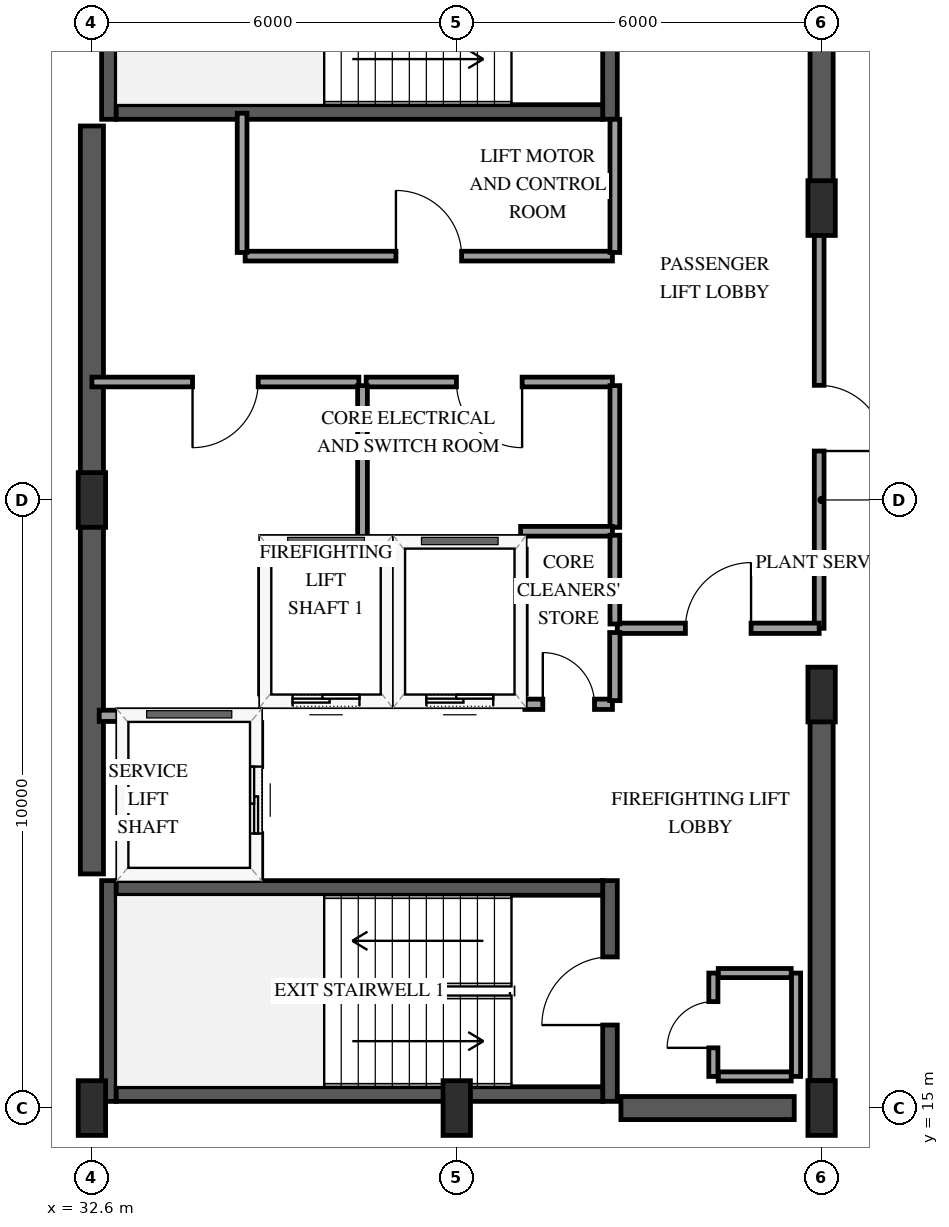
"""IFC4 building model, lengths in metres.
Left out: names, types, materials, properties, quantities, classifications, styles, units other than length and angle.
Written with IfcOpenShell. Run it as: python <this file> out.ifc"""

import sys

from ifc_helpers import new_model, si_unit, direction, frame, frame_2d, origin, origin_2d, place, context, subcontext, project, spatial, rectangle, extrude, element, fill, save


model = new_model("IFC4")
c1 = context("Model", 3, precision=1e-05, world=origin(), true_north=direction((0.0, 1.0)))
c2 = subcontext(c1, "Body", "Model", "MODEL_VIEW")
j1 = project(units=[si_unit("LENGTHUNIT", "METRE"), si_unit("PLANEANGLEUNIT", "RADIAN")], contexts=[c1])
p1 = place(None, origin())
s1 = spatial("IfcSite", under=j1, at=p1, CompositionType="ELEMENT")
p2 = place(p1, origin())
s2 = spatial("IfcBuilding", under=s1, at=p2, CompositionType="ELEMENT")
p3 = place(p2, frame((0.0, 0.0, 309.85)))
s3 = spatial("IfcBuildingStorey", under=s2, at=p3, CompositionType="ELEMENT", Elevation=309.85)
p4 = place(p3, frame((32.88, 15.11, 0.0), z_axis=(0.0, 0.0, 1.0), x_axis=(0.0, 1.0, 0.0)))
e1 = element("IfcWall", 1, at=p4, inside=s3, PredefinedType="SHEAR", context=c2, shape_type="SweptSolid", body=[
    extrude(rectangle(XDim=3.63, YDim=0.24, at=frame_2d((1.815, 0.0))), origin(), (0.0, 0.0, 1.0), 4.2),
])
p5 = place(p3, frame((41.12, 15.11, 0.0), z_axis=(0.0, 0.0, 1.0), x_axis=(0.0, 1.0, 0.0)))
e2 = element("IfcWall", 2, at=p5, inside=s3, PredefinedType="SHEAR", context=c2, shape_type="SweptSolid", body=[
    extrude(rectangle(XDim=3.63, YDim=0.24, at=frame_2d((1.815, 0.0))), origin(), (0.0, 0.0, 1.0), 4.2),
])
p6 = place(p5, frame((1.255, 0.0, 0.0)))
e3 = element("IfcOpeningElement", 3, at=p6, cuts=e2, PredefinedType="OPENING", context=c2, shape_type="SweptSolid", body=[
    extrude(rectangle(XDim=1.12, YDim=2.15, at=frame_2d((0.56, 1.075))), frame((0.0, 0.13, 0.0), z_axis=(0.0, -1.0, 0.0), x_axis=(1.0, 0.0, 0.0)), (0.0, 0.0, 1.0), 0.26),
])
for number, where, z_axis, x_axis in (
    (4, (33.0, 15.23, 0.0), (0.0, 0.0, 1.0), (1.0, 0.0, 0.0)),
    (5, (33.0, 18.62, 0.0), (0.0, 0.0, 1.0), (1.0, 0.0, 0.0)),
):
    element("IfcWall", number, at=place(p3, frame(where, z_axis=z_axis, x_axis=x_axis)), inside=s3, PredefinedType="SHEAR", context=c2, shape_type="SweptSolid", body=[
        extrude(rectangle(XDim=8.0, YDim=0.24, at=frame_2d((4.0, 0.0))), origin(), (0.0, 0.0, 1.0), 4.2),
    ])
p7 = place(p3, frame((32.88, 31.26, 0.0), z_axis=(0.0, 0.0, 1.0), x_axis=(0.0, 1.0, 0.0)))
e6 = element("IfcWall", 6, at=p7, inside=s3, PredefinedType="SHEAR", context=c2, shape_type="SweptSolid", body=[
    extrude(rectangle(XDim=3.63, YDim=0.24, at=frame_2d((1.815, 0.0))), origin(), (0.0, 0.0, 1.0), 4.2),
])
p8 = place(p3, frame((41.12, 31.26, 0.0), z_axis=(0.0, 0.0, 1.0), x_axis=(0.0, 1.0, 0.0)))
e7 = element("IfcWall", 7, at=p8, inside=s3, PredefinedType="SHEAR", context=c2, shape_type="SweptSolid", body=[
    extrude(rectangle(XDim=3.63, YDim=0.24, at=frame_2d((1.815, 0.0))), origin(), (0.0, 0.0, 1.0), 4.2),
])
p9 = place(p8, frame((1.255, 0.0, 0.0)))
e8 = element("IfcOpeningElement", 8, at=p9, cuts=e7, PredefinedType="OPENING", context=c2, shape_type="SweptSolid", body=[
    extrude(rectangle(XDim=1.12, YDim=2.15, at=frame_2d((0.56, 1.075))), frame((0.0, 0.13, 0.0), z_axis=(0.0, -1.0, 0.0), x_axis=(1.0, 0.0, 0.0)), (0.0, 0.0, 1.0), 0.26),
])
p10 = place(p3, frame((33.0, 31.38, 0.0), z_axis=(0.0, 0.0, 1.0), x_axis=(1.0, 0.0, 0.0)))
e9 = element("IfcWall", 9, at=p10, inside=s3, PredefinedType="SHEAR", context=c2, shape_type="SweptSolid", body=[
    extrude(rectangle(XDim=8.0, YDim=0.24, at=frame_2d((4.0, 0.0))), origin(), (0.0, 0.0, 1.0), 4.2),
])
p11 = place(p3, frame((32.6, 18.85, 0.0), z_axis=(0.0, 0.0, 1.0), x_axis=(0.0, 1.0, 0.0)))
e10 = element("IfcWall", 10, at=p11, inside=s3, PredefinedType="SHEAR", context=c2, shape_type="SweptSolid", body=[
    extrude(rectangle(XDim=12.3, YDim=0.38, at=frame_2d((6.15, 0.0))), origin(), (0.0, 0.0, 1.0), 4.2),
])
p12 = place(p3, frame((41.3, 15.0, 0.0), z_axis=(0.0, 0.0, 1.0), x_axis=(1.0, 0.0, 0.0)))
e11 = element("IfcWall", 11, at=p12, inside=s3, PredefinedType="SHEAR", context=c2, shape_type="SweptSolid", body=[
    extrude(rectangle(XDim=2.85, YDim=0.38, at=frame_2d((1.425, 0.0))), origin(), (0.0, 0.0, 1.0), 4.2),
])
p13 = place(p3, frame((44.6, 15.45, 0.0), z_axis=(0.0, 0.0, 1.0), x_axis=(0.0, 1.0, 0.0)))
e12 = element("IfcWall", 12, at=p13, inside=s3, PredefinedType="SHEAR", context=c2, shape_type="SweptSolid", body=[
    extrude(rectangle(XDim=6.35, YDim=0.38, at=frame_2d((3.175, 0.0))), origin(), (0.0, 0.0, 1.0), 4.2),
])
p14 = place(p3, frame((44.6, 29.8, 0.0), z_axis=(0.0, 0.0, 1.0), x_axis=(0.0, 1.0, 0.0)))
e13 = element("IfcWall", 13, at=p14, inside=s3, PredefinedType="SHEAR", context=c2, shape_type="SweptSolid", body=[
    extrude(rectangle(XDim=4.75, YDim=0.38, at=frame_2d((2.375, 0.0))), origin(), (0.0, 0.0, 1.0), 4.2),
])
for number, where, z_axis, x_axis in (
    (14, (32.6, 15.0, 0.0), (0.0, 0.0, 1.0), (1.0, 0.0, 0.0)),
    (15, (32.6, 25.0, 0.0), (0.0, 0.0, 1.0), (1.0, 0.0, 0.0)),
    (16, (38.6, 15.0, 0.0), (0.0, 0.0, 1.0), (1.0, 0.0, 0.0)),
    (17, (44.6, 15.0, 0.0), (0.0, 0.0, 1.0), (1.0, 0.0, 0.0)),
    (18, (44.6, 21.8, 0.0), (0.0, 0.0, 1.0), (1.0, 0.0, 0.0)),
    (19, (44.6, 29.8, 0.0), (0.0, 0.0, 1.0), (1.0, 0.0, 0.0)),
):
    element("IfcColumn", number, at=place(p3, frame(where, z_axis=z_axis, x_axis=x_axis)), inside=s3, PredefinedType="PILASTER", context=c2, shape_type="SweptSolid", body=[
        extrude(rectangle(XDim=0.45, YDim=0.9, at=origin_2d()), origin(), (0.0, 0.0, 1.0), 4.2),
    ])
p15 = place(p3, frame((30.606, 14.373, 0.0), z_axis=(0.0, 0.0, 1.0), x_axis=(0.833507833443, -0.552507639394, 0.0)))
e20 = element("IfcWall", 20, at=p15, inside=s3, PredefinedType="SOLIDWALL", context=c2, shape_type="SweptSolid", body=[
    extrude(rectangle(XDim=6.584, YDim=0.27, at=frame_2d((3.292, 0.0))), origin(), (0.0, 0.0, 1.0), 3.195),
])
p16 = place(p3, frame((35.45, 21.7, 0.0), z_axis=(0.0, 0.0, 1.0), x_axis=(1.0, 0.0, 0.0)))
e21 = element("IfcWall", 21, at=p16, inside=s3, PredefinedType="SOLIDWALL", context=c2, shape_type="SweptSolid", body=[
    extrude(rectangle(XDim=2.0, YDim=0.185, at=frame_2d((1.0, 0.0))), origin(), (0.0, 0.0, 1.0), 3.895),
])
p17 = place(p16, frame((0.45, 0.0, 0.0)))
e22 = element("IfcOpeningElement", 22, at=p17, cuts=e21, PredefinedType="OPENING", context=c2, shape_type="SweptSolid", body=[
    extrude(rectangle(XDim=1.1, YDim=2.15, at=frame_2d((0.55, 1.075))), frame((0.0, 0.103, 0.0), z_axis=(0.0, -1.0, 0.0), x_axis=(1.0, 0.0, 0.0)), (0.0, 0.0, 1.0), 0.205),
])
p18 = place(p3, frame((35.45, 24.3, 0.0), z_axis=(0.0, 0.0, 1.0), x_axis=(1.0, 0.0, 0.0)))
e23 = element("IfcWall", 23, at=p18, inside=s3, PredefinedType="SOLIDWALL", context=c2, shape_type="SweptSolid", body=[
    extrude(rectangle(XDim=2.0, YDim=0.185, at=frame_2d((1.0, 0.0))), origin(), (0.0, 0.0, 1.0), 3.895),
])
for number, where, z_axis, x_axis in (
    (24, (35.45, 21.81, 0.0), (0.0, 0.0, 1.0), (0.0, 1.0, 0.0)),
    (25, (37.45, 21.81, 0.0), (0.0, 0.0, 1.0), (0.0, 1.0, 0.0)),
):
    element("IfcWall", number, at=place(p3, frame(where, z_axis=z_axis, x_axis=x_axis)), inside=s3, PredefinedType="SOLIDWALL", context=c2, shape_type="SweptSolid", body=[
        extrude(rectangle(XDim=2.38, YDim=0.185, at=frame_2d((1.19, 0.0))), origin(), (0.0, 0.0, 1.0), 3.895),
    ])
p19 = place(p3, frame((37.65, 21.7, 0.0), z_axis=(0.0, 0.0, 1.0), x_axis=(1.0, 0.0, 0.0)))
e26 = element("IfcWall", 26, at=p19, inside=s3, PredefinedType="SOLIDWALL", context=c2, shape_type="SweptSolid", body=[
    extrude(rectangle(XDim=2.0, YDim=0.185, at=frame_2d((1.0, 0.0))), origin(), (0.0, 0.0, 1.0), 3.895),
])
p20 = place(p19, frame((0.45, 0.0, 0.0)))
e27 = element("IfcOpeningElement", 27, at=p20, cuts=e26, PredefinedType="OPENING", context=c2, shape_type="SweptSolid", body=[
    extrude(rectangle(XDim=1.1, YDim=2.15, at=frame_2d((0.55, 1.075))), frame((0.0, 0.103, 0.0), z_axis=(0.0, -1.0, 0.0), x_axis=(1.0, 0.0, 0.0)), (0.0, 0.0, 1.0), 0.205),
])
p21 = place(p3, frame((37.65, 24.3, 0.0), z_axis=(0.0, 0.0, 1.0), x_axis=(1.0, 0.0, 0.0)))
e28 = element("IfcWall", 28, at=p21, inside=s3, PredefinedType="SOLIDWALL", context=c2, shape_type="SweptSolid", body=[
    extrude(rectangle(XDim=2.0, YDim=0.185, at=frame_2d((1.0, 0.0))), origin(), (0.0, 0.0, 1.0), 3.895),
])
p22 = place(p3, frame((39.65, 21.81, 0.0), z_axis=(0.0, 0.0, 1.0), x_axis=(0.0, 1.0, 0.0)))
e29 = element("IfcWall", 29, at=p22, inside=s3, PredefinedType="SOLIDWALL", context=c2, shape_type="SweptSolid", body=[
    extrude(rectangle(XDim=2.38, YDim=0.185, at=frame_2d((1.19, 0.0))), origin(), (0.0, 0.0, 1.0), 3.895),
])
p23 = place(p3, frame((32.72, 21.45, 0.0), z_axis=(0.0, 0.0, 1.0), x_axis=(1.0, 0.0, 0.0)))
e30 = element("IfcWall", 30, at=p23, inside=s3, PredefinedType="SOLIDWALL", context=c2, shape_type="SweptSolid", body=[
    extrude(rectangle(XDim=2.58, YDim=0.185, at=frame_2d((1.29, 0.0))), origin(), (0.0, 0.0, 1.0), 3.895),
])
p24 = place(p3, frame((35.3, 18.79, 0.0), z_axis=(0.0, 0.0, 1.0), x_axis=(0.0, 1.0, 0.0)))
e31 = element("IfcWall", 31, at=p24, inside=s3, PredefinedType="SOLIDWALL", context=c2, shape_type="SweptSolid", body=[
    extrude(rectangle(XDim=2.55, YDim=0.185, at=frame_2d((1.275, 0.0))), origin(), (0.0, 0.0, 1.0), 3.895),
])
p25 = place(p24, frame((0.725, 0.0, 0.0)))
e32 = element("IfcOpeningElement", 32, at=p25, cuts=e31, PredefinedType="OPENING", context=c2, shape_type="SweptSolid", body=[
    extrude(rectangle(XDim=1.1, YDim=2.15, at=frame_2d((0.55, 1.075))), frame((0.0, 0.103, 0.0), z_axis=(0.0, -1.0, 0.0), x_axis=(1.0, 0.0, 0.0)), (0.0, 0.0, 1.0), 0.205),
])
for number, where, z_axis, x_axis in (
    (33, (42.9, 15.52, 0.0), (0.0, 0.0, 1.0), (1.0, 0.0, 0.0)),
    (34, (42.9, 17.22, 0.0), (0.0, 0.0, 1.0), (1.0, 0.0, 0.0)),
):
    element("IfcWall", number, at=place(p3, frame(where, z_axis=z_axis, x_axis=x_axis)), inside=s3, PredefinedType="PARTITIONING", context=c2, shape_type="SweptSolid", body=[
        extrude(rectangle(XDim=1.2, YDim=0.15, at=frame_2d((0.6, 0.0))), origin(), (0.0, 0.0, 1.0), 3.895),
    ])
p26 = place(p3, frame((44.18, 15.52, 0.0), z_axis=(0.0, 0.0, 1.0), x_axis=(0.0, 1.0, 0.0)))
e35 = element("IfcWall", 35, at=p26, inside=s3, PredefinedType="PARTITIONING", context=c2, shape_type="SweptSolid", body=[
    extrude(rectangle(XDim=1.7, YDim=0.15, at=frame_2d((0.85, 0.0))), origin(), (0.0, 0.0, 1.0), 3.895),
])
p27 = place(p3, frame((42.82, 15.52, 0.0), z_axis=(0.0, 0.0, 1.0), x_axis=(0.0, 1.0, 0.0)))
e36 = element("IfcWall", 36, at=p27, inside=s3, PredefinedType="PARTITIONING", context=c2, shape_type="SweptSolid", body=[
    extrude(rectangle(XDim=1.7, YDim=0.15, at=frame_2d((0.85, 0.0))), origin(), (0.0, 0.0, 1.0), 3.895),
])
p28 = place(p27, frame((0.47, 0.0, 0.0)))
e37 = element("IfcOpeningElement", 37, at=p28, cuts=e36, PredefinedType="OPENING", context=c2, shape_type="SweptSolid", body=[
    extrude(rectangle(XDim=0.76, YDim=2.0, at=frame_2d((0.38, 1.0))), frame((0.0, 0.085, 0.0), z_axis=(0.0, -1.0, 0.0), x_axis=(1.0, 0.0, 0.0)), (0.0, 0.0, 1.0), 0.17),
])
p29 = place(p3, frame((44.56, 29.8, 0.0), z_axis=(0.0, 0.0, 1.0), x_axis=(0.0, -1.0, 0.0)))
e38 = element("IfcWall", 38, at=p29, inside=s3, PredefinedType="PARTITIONING", context=c2, shape_type="SweptSolid", body=[
    extrude(rectangle(XDim=6.91, YDim=0.16, at=frame_2d((3.455, 0.0))), origin(), (0.0, 0.0, 1.0), 2.935),
])
p30 = place(p29, frame((2.915, 0.0, 0.0)))
e39 = element("IfcOpeningElement", 39, at=p30, cuts=e38, PredefinedType="OPENING", context=c2, shape_type="SweptSolid", body=[
    extrude(rectangle(XDim=1.08, YDim=2.15, at=frame_2d((0.54, 1.075))), frame((0.0, 0.09, 0.0), z_axis=(0.0, -1.0, 0.0), x_axis=(1.0, 0.0, 0.0)), (0.0, 0.0, 1.0), 0.18),
])
p31 = place(p3, frame((35.12, 29.01, 0.0), z_axis=(0.0, 0.0, 1.0), x_axis=(1.0, 0.0, 0.0)))
e40 = element("IfcWall", 40, at=p31, inside=s3, PredefinedType="PARTITIONING", context=c2, shape_type="SweptSolid", body=[
    extrude(rectangle(XDim=6.04, YDim=0.16, at=frame_2d((3.02, 0.0))), origin(), (0.0, 0.0, 1.0), 3.895),
])
p32 = place(p31, frame((2.48, 0.0, 0.0)))
e41 = element("IfcOpeningElement", 41, at=p32, cuts=e40, PredefinedType="OPENING", context=c2, shape_type="SweptSolid", body=[
    extrude(rectangle(XDim=1.08, YDim=2.15, at=frame_2d((0.54, 1.075))), frame((0.0, 0.09, 0.0), z_axis=(0.0, -1.0, 0.0), x_axis=(1.0, 0.0, 0.0)), (0.0, 0.0, 1.0), 0.18),
])
p33 = place(p3, frame((36.99, 26.94, 0.0), z_axis=(0.0, 0.0, 1.0), x_axis=(-1.0, 0.0, 0.0)))
e42 = element("IfcWall", 42, at=p33, inside=s3, PredefinedType="PARTITIONING", context=c2, shape_type="SweptSolid", body=[
    extrude(rectangle(XDim=4.39, YDim=0.16, at=frame_2d((2.195, 0.0))), origin(), (0.0, 0.0, 1.0), 3.895),
])
p34 = place(p33, frame((1.655, 0.0, 0.0)))
e43 = element("IfcOpeningElement", 43, at=p34, cuts=e42, PredefinedType="OPENING", context=c2, shape_type="SweptSolid", body=[
    extrude(rectangle(XDim=1.08, YDim=2.15, at=frame_2d((0.54, 1.075))), frame((0.0, 0.09, 0.0), z_axis=(0.0, -1.0, 0.0), x_axis=(1.0, 0.0, 0.0)), (0.0, 0.0, 1.0), 0.18),
])
p35 = place(p3, frame((41.16, 26.94, 0.0), z_axis=(0.0, 0.0, 1.0), x_axis=(-1.0, 0.0, 0.0)))
e44 = element("IfcWall", 44, at=p35, inside=s3, PredefinedType="PARTITIONING", context=c2, shape_type="SweptSolid", body=[
    extrude(rectangle(XDim=4.05, YDim=0.16, at=frame_2d((2.025, 0.0))), origin(), (0.0, 0.0, 1.0), 3.895),
])
p36 = place(p35, frame((1.485, 0.0, 0.0)))
e45 = element("IfcOpeningElement", 45, at=p36, cuts=e44, PredefinedType="OPENING", context=c2, shape_type="SweptSolid", body=[
    extrude(rectangle(XDim=1.08, YDim=2.15, at=frame_2d((0.54, 1.075))), frame((0.0, 0.09, 0.0), z_axis=(0.0, -1.0, 0.0), x_axis=(1.0, 0.0, 0.0)), (0.0, 0.0, 1.0), 0.18),
])
p37 = place(p3, frame((41.24, 22.89, 0.0), z_axis=(0.0, 0.0, 1.0), x_axis=(1.0, 0.0, 0.0)))
e46 = element("IfcWall", 46, at=p37, inside=s3, PredefinedType="PARTITIONING", context=c2, shape_type="SweptSolid", body=[
    extrude(rectangle(XDim=3.32, YDim=0.17, at=frame_2d((1.66, 0.0))), origin(), (0.0, 0.0, 1.0), 3.895),
])
p38 = place(p37, frame((1.12, 0.0, 0.0)))
e47 = element("IfcOpeningElement", 47, at=p38, cuts=e46, PredefinedType="OPENING", context=c2, shape_type="SweptSolid", body=[
    extrude(rectangle(XDim=1.08, YDim=2.15, at=frame_2d((0.54, 1.075))), frame((0.0, 0.095, 0.0), z_axis=(0.0, -1.0, 0.0), x_axis=(1.0, 0.0, 0.0)), (0.0, 0.0, 1.0), 0.19),
])
p39 = place(p3, frame((37.05, 26.88, 0.0), z_axis=(0.0, 0.0, 1.0), x_axis=(0.0, -1.0, 0.0)))
e48 = element("IfcWall", 48, at=p39, inside=s3, PredefinedType="PARTITIONING", context=c2, shape_type="SweptSolid", body=[
    extrude(rectangle(XDim=2.58, YDim=0.16, at=frame_2d((1.29, 0.0))), origin(), (0.0, 0.0, 1.0), 3.895),
])
p40 = place(p3, frame((41.2, 24.55, 0.0), z_axis=(0.0, 0.0, 1.0), x_axis=(0.0, 1.0, 0.0)))
e49 = element("IfcWall", 49, at=p40, inside=s3, PredefinedType="PARTITIONING", context=c2, shape_type="SweptSolid", body=[
    extrude(rectangle(XDim=2.33, YDim=0.16, at=frame_2d((1.165, 0.0))), origin(), (0.0, 0.0, 1.0), 3.895),
])
p41 = place(p3, frame((35.07, 31.36, 0.0), z_axis=(0.0, 0.0, 1.0), x_axis=(0.0, -1.0, 0.0)))
e50 = element("IfcWall", 50, at=p41, inside=s3, PredefinedType="PARTITIONING", context=c2, shape_type="SweptSolid", body=[
    extrude(rectangle(XDim=2.29, YDim=0.16, at=frame_2d((1.145, 0.0))), origin(), (0.0, 0.0, 1.0), 3.895),
])
p42 = place(p3, frame((41.2, 29.07, 0.0), z_axis=(0.0, 0.0, 1.0), x_axis=(0.0, 1.0, 0.0)))
e51 = element("IfcWall", 51, at=p42, inside=s3, PredefinedType="PARTITIONING", context=c2, shape_type="SweptSolid", body=[
    extrude(rectangle(XDim=2.19, YDim=0.16, at=frame_2d((1.095, 0.0))), origin(), (0.0, 0.0, 1.0), 3.895),
])
p43 = place(p3, frame((39.65, 24.485, 0.0), z_axis=(0.0, 0.0, 1.0), x_axis=(1.0, 0.0, 0.0)))
e52 = element("IfcWall", 52, at=p43, inside=s3, PredefinedType="PARTITIONING", context=c2, shape_type="SweptSolid", body=[
    extrude(rectangle(XDim=1.51, YDim=0.16, at=frame_2d((0.755, 0.0))), origin(), (0.0, 0.0, 1.0), 3.895),
])
p44 = place(p3, frame((41.2, 22.96, 0.0), z_axis=(0.0, 0.0, 1.0), x_axis=(0.0, 1.0, 0.0)))
e53 = element("IfcWall", 53, at=p44, inside=s3, PredefinedType="PARTITIONING", context=c2, shape_type="SweptSolid", body=[
    extrude(rectangle(XDim=1.46, YDim=0.16, at=frame_2d((0.73, 0.0))), origin(), (0.0, 0.0, 1.0), 3.895),
])
p45 = place(p3, frame((39.72, 21.64, 0.0), z_axis=(0.0, 0.0, 1.0), x_axis=(1.0, 0.0, 0.0)))
e54 = element("IfcWall", 54, at=p45, inside=s3, PredefinedType="PARTITIONING", context=c2, shape_type="SweptSolid", body=[
    extrude(rectangle(XDim=1.44, YDim=0.17, at=frame_2d((0.72, 0.0))), origin(), (0.0, 0.0, 1.0), 3.895),
])
p46 = place(p45, frame((0.295, 0.0, 0.0)))
e55 = element("IfcOpeningElement", 55, at=p46, cuts=e54, PredefinedType="OPENING", context=c2, shape_type="SweptSolid", body=[
    extrude(rectangle(XDim=0.85, YDim=2.1, at=frame_2d((0.425, 1.05))), frame((0.0, 0.095, 0.0), z_axis=(0.0, -1.0, 0.0), x_axis=(1.0, 0.0, 0.0)), (0.0, 0.0, 1.0), 0.19),
])
p47 = place(p3, frame((41.2, 21.7, 0.0), z_axis=(0.0, 0.0, 1.0), x_axis=(0.0, 1.0, 0.0)))
e56 = element("IfcWall", 56, at=p47, inside=s3, PredefinedType="PARTITIONING", context=c2, shape_type="SweptSolid", body=[
    extrude(rectangle(XDim=1.12, YDim=0.17, at=frame_2d((0.56, 0.0))), origin(), (0.0, 0.0, 1.0), 3.895),
])
p48 = place(p17, origin())
e57 = element("IfcDoor", 57, at=p48, inside=s3, OperationType="SLIDING_TO_LEFT", PredefinedType="DOOR", context=c2, shape_type="SweptSolid", body=[
    extrude(rectangle(XDim=1.1, YDim=2.15, at=frame_2d((0.55, 1.075))), frame((0.0, 0.025, 0.0), z_axis=(0.0, -1.0, 0.0), x_axis=(1.0, 0.0, 0.0)), (0.0, 0.0, 1.0), 0.05),
])
fill(e22, e57)
p49 = place(p20, origin())
e58 = element("IfcDoor", 58, at=p49, inside=s3, OperationType="SLIDING_TO_LEFT", PredefinedType="DOOR", context=c2, shape_type="SweptSolid", body=[
    extrude(rectangle(XDim=1.1, YDim=2.15, at=frame_2d((0.55, 1.075))), frame((0.0, 0.025, 0.0), z_axis=(0.0, -1.0, 0.0), x_axis=(1.0, 0.0, 0.0)), (0.0, 0.0, 1.0), 0.05),
])
fill(e27, e58)
p50 = place(p25, origin())
e59 = element("IfcDoor", 59, at=p50, inside=s3, OperationType="SLIDING_TO_LEFT", PredefinedType="DOOR", context=c2, shape_type="SweptSolid", body=[
    extrude(rectangle(XDim=1.1, YDim=2.15, at=frame_2d((0.55, 1.075))), frame((0.0, 0.025, 0.0), z_axis=(0.0, -1.0, 0.0), x_axis=(1.0, 0.0, 0.0)), (0.0, 0.0, 1.0), 0.05),
])
fill(e32, e59)
p51 = place(p6, origin())
e60 = element("IfcDoor", 60, at=p51, inside=s3, OperationType="SINGLE_SWING_LEFT", PredefinedType="DOOR", context=c2, shape_type="SweptSolid", body=[
    extrude(rectangle(XDim=1.12, YDim=2.15, at=frame_2d((0.56, 1.075))), frame((0.0, 0.025, 0.0), z_axis=(0.0, -1.0, 0.0), x_axis=(1.0, 0.0, 0.0)), (0.0, 0.0, 1.0), 0.05),
])
fill(e3, e60)
p52 = place(p28, origin())
e61 = element("IfcDoor", 61, at=p52, inside=s3, OperationType="SINGLE_SWING_LEFT", PredefinedType="TRAPDOOR", context=c2, shape_type="SweptSolid", body=[
    extrude(rectangle(XDim=0.76, YDim=2.0, at=frame_2d((0.38, 1.0))), frame((0.0, 0.025, 0.0), z_axis=(0.0, -1.0, 0.0), x_axis=(1.0, 0.0, 0.0)), (0.0, 0.0, 1.0), 0.05),
])
fill(e37, e61)
p53 = place(p30, origin())
e62 = element("IfcDoor", 62, at=p53, inside=s3, OperationType="SINGLE_SWING_RIGHT", PredefinedType="DOOR", context=c2, shape_type="SweptSolid", body=[
    extrude(rectangle(XDim=1.08, YDim=2.15, at=frame_2d((0.54, 1.075))), frame((0.0, 0.025, 0.0), z_axis=(0.0, -1.0, 0.0), x_axis=(1.0, 0.0, 0.0)), (0.0, 0.0, 1.0), 0.05),
])
fill(e39, e62)
p54 = place(p32, origin())
e63 = element("IfcDoor", 63, at=p54, inside=s3, OperationType="SINGLE_SWING_LEFT", PredefinedType="DOOR", context=c2, shape_type="SweptSolid", body=[
    extrude(rectangle(XDim=1.08, YDim=2.15, at=frame_2d((0.54, 1.075))), frame((0.0, 0.025, 0.0), z_axis=(0.0, -1.0, 0.0), x_axis=(1.0, 0.0, 0.0)), (0.0, 0.0, 1.0), 0.05),
])
fill(e41, e63)
p55 = place(p34, origin())
e64 = element("IfcDoor", 64, at=p55, inside=s3, OperationType="SINGLE_SWING_RIGHT", PredefinedType="DOOR", context=c2, shape_type="SweptSolid", body=[
    extrude(rectangle(XDim=1.08, YDim=2.15, at=frame_2d((0.54, 1.075))), frame((0.0, 0.025, 0.0), z_axis=(0.0, -1.0, 0.0), x_axis=(1.0, 0.0, 0.0)), (0.0, 0.0, 1.0), 0.05),
])
fill(e43, e64)
p56 = place(p36, origin())
e65 = element("IfcDoor", 65, at=p56, inside=s3, OperationType="SINGLE_SWING_LEFT", PredefinedType="DOOR", context=c2, shape_type="SweptSolid", body=[
    extrude(rectangle(XDim=1.08, YDim=2.15, at=frame_2d((0.54, 1.075))), frame((0.0, 0.025, 0.0), z_axis=(0.0, -1.0, 0.0), x_axis=(1.0, 0.0, 0.0)), (0.0, 0.0, 1.0), 0.05),
])
fill(e45, e65)
p57 = place(p38, origin())
e66 = element("IfcDoor", 66, at=p57, inside=s3, OperationType="SINGLE_SWING_RIGHT", PredefinedType="DOOR", context=c2, shape_type="SweptSolid", body=[
    extrude(rectangle(XDim=1.08, YDim=2.15, at=frame_2d((0.54, 1.075))), frame((0.0, 0.025, 0.0), z_axis=(0.0, -1.0, 0.0), x_axis=(1.0, 0.0, 0.0)), (0.0, 0.0, 1.0), 0.05),
])
fill(e47, e66)
p58 = place(p46, origin())
e67 = element("IfcDoor", 67, at=p58, inside=s3, OperationType="SINGLE_SWING_LEFT", PredefinedType="DOOR", context=c2, shape_type="SweptSolid", body=[
    extrude(rectangle(XDim=0.85, YDim=2.1, at=frame_2d((0.425, 1.05))), frame((0.0, 0.025, 0.0), z_axis=(0.0, -1.0, 0.0), x_axis=(1.0, 0.0, 0.0)), (0.0, 0.0, 1.0), 0.05),
])
fill(e55, e67)
save(model, sys.argv[1])
